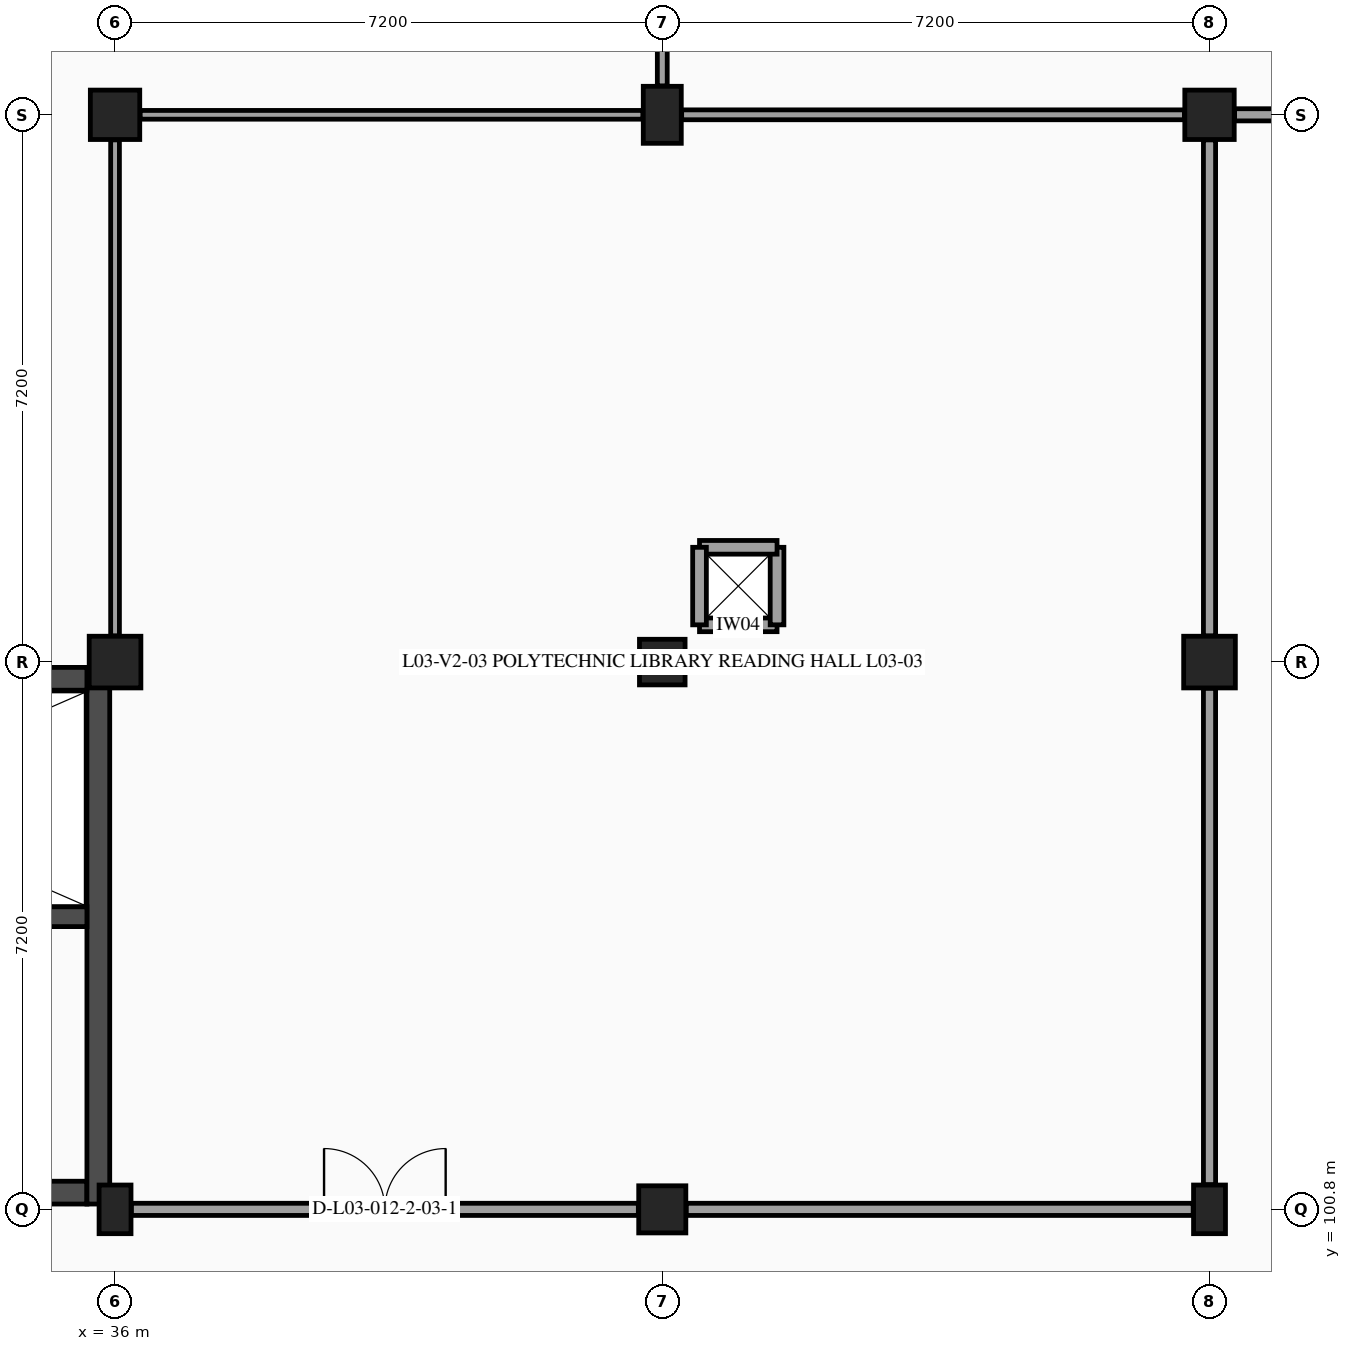
"""IFC4 building model, lengths in metres.
Left out: names, types, materials, properties, quantities, classifications, styles, units other than length and angle.
Written with IfcOpenShell. Run it as: python <this file> out.ifc"""

import sys

from ifc_helpers import new_model, si_unit, direction, frame, frame_2d, origin, origin_2d, place, context, subcontext, project, spatial, rectangle, extrude, element, fill, save


model = new_model("IFC4")
c1 = context("Model", 3, precision=1e-05, world=origin(), true_north=direction((0.0, 1.0)))
c2 = subcontext(c1, "Body", "Model", "MODEL_VIEW")
j1 = project(units=[si_unit("LENGTHUNIT", "METRE"), si_unit("PLANEANGLEUNIT", "RADIAN")], contexts=[c1])
p1 = place(None, origin())
s1 = spatial("IfcSite", under=j1, at=p1, CompositionType="ELEMENT")
p2 = place(p1, origin())
s2 = spatial("IfcBuilding", under=s1, at=p2, CompositionType="ELEMENT")
p3 = place(p2, frame((0.0, 0.0, 14.4)))
s3 = spatial("IfcBuildingStorey", under=s2, at=p3, CompositionType="ELEMENT", Elevation=14.4)
p4 = place(p3, frame((36.0, 100.8, 0.0), z_axis=(0.0, 0.0, 1.0), x_axis=(1.0, 0.0, 0.0)))
e1 = element("IfcColumn", 1, at=p4, inside=s3, PredefinedType="PILASTER", context=c2, shape_type="SweptSolid", body=[
    extrude(rectangle(XDim=0.42, YDim=0.64, at=origin_2d()), origin(), (0.0, 0.0, 1.0), 4.2),
])
p5 = place(p3, frame((36.0, 108.0, 0.0), z_axis=(0.0, 0.0, 1.0), x_axis=(1.0, 0.0, 0.0)))
e2 = element("IfcColumn", 2, at=p5, inside=s3, PredefinedType="COLUMN", context=c2, shape_type="SweptSolid", body=[
    extrude(rectangle(XDim=0.68, YDim=0.68, at=origin_2d()), origin(), (0.0, 0.0, 1.0), 4.2),
])
p6 = place(p3, frame((36.0, 115.2, 0.0), z_axis=(0.0, 0.0, 1.0), x_axis=(1.0, 0.0, 0.0)))
e3 = element("IfcColumn", 3, at=p6, inside=s3, PredefinedType="COLUMN", context=c2, shape_type="SweptSolid", body=[
    extrude(rectangle(XDim=0.65, YDim=0.65, at=origin_2d()), origin(), (0.0, 0.0, 1.0), 4.2),
])
p7 = place(p3, frame((43.2, 100.8, 0.0), z_axis=(0.0, 0.0, 1.0), x_axis=(1.0, 0.0, 0.0)))
e4 = element("IfcColumn", 4, at=p7, inside=s3, PredefinedType="COLUMN", context=c2, shape_type="SweptSolid", body=[
    extrude(rectangle(XDim=0.62, YDim=0.62, at=origin_2d()), origin(), (0.0, 0.0, 1.0), 4.2),
])
p8 = place(p3, frame((43.2, 108.0, 0.0), z_axis=(0.0, 0.0, 1.0), x_axis=(1.0, 0.0, 0.0)))
e5 = element("IfcColumn", 5, at=p8, inside=s3, PredefinedType="COLUMN", context=c2, shape_type="SweptSolid", body=[
    extrude(rectangle(XDim=0.6, YDim=0.6, at=origin_2d()), origin(), (0.0, 0.0, 1.0), 4.2),
])
p9 = place(p3, frame((43.2, 115.2, 0.0), z_axis=(0.0, 0.0, 1.0), x_axis=(1.0, 0.0, 0.0)))
e6 = element("IfcColumn", 6, at=p9, inside=s3, PredefinedType="COLUMN", context=c2, shape_type="SweptSolid", body=[
    extrude(rectangle(XDim=0.5, YDim=0.75, at=origin_2d()), origin(), (0.0, 0.0, 1.0), 4.2),
])
p10 = place(p3, frame((50.4, 100.8, 0.0), z_axis=(0.0, 0.0, 1.0), x_axis=(1.0, 0.0, 0.0)))
e7 = element("IfcColumn", 7, at=p10, inside=s3, PredefinedType="PILASTER", context=c2, shape_type="SweptSolid", body=[
    extrude(rectangle(XDim=0.42, YDim=0.64, at=origin_2d()), origin(), (0.0, 0.0, 1.0), 4.2),
])
p11 = place(p3, frame((50.4, 108.0, 0.0), z_axis=(0.0, 0.0, 1.0), x_axis=(1.0, 0.0, 0.0)))
e8 = element("IfcColumn", 8, at=p11, inside=s3, PredefinedType="COLUMN", context=c2, shape_type="SweptSolid", body=[
    extrude(rectangle(XDim=0.68, YDim=0.68, at=origin_2d()), origin(), (0.0, 0.0, 1.0), 4.2),
])
p12 = place(p3, frame((50.4, 115.2, 0.0), z_axis=(0.0, 0.0, 1.0), x_axis=(1.0, 0.0, 0.0)))
e9 = element("IfcColumn", 9, at=p12, inside=s3, PredefinedType="COLUMN", context=c2, shape_type="SweptSolid", body=[
    extrude(rectangle(XDim=0.65, YDim=0.65, at=origin_2d()), origin(), (0.0, 0.0, 1.0), 4.2),
])
p13 = place(p3, frame((28.95, 101.02, 0.0), z_axis=(0.0, 0.0, 1.0), x_axis=(1.0, 0.0, 0.0)))
e10 = element("IfcWall", 10, at=p13, inside=s3, PredefinedType="SHEAR", context=c2, shape_type="SweptSolid", body=[
    extrude(rectangle(XDim=6.68, YDim=0.3, at=frame_2d((3.34, 0.0))), origin(), (0.0, 0.0, 1.0), 3.94),
])
p14 = place(p13, frame((2.22, 0.0, 0.0)))
e11 = element("IfcOpeningElement", 11, at=p14, cuts=e10, PredefinedType="OPENING", context=c2, shape_type="SweptSolid", body=[
    extrude(rectangle(XDim=1.8, YDim=2.2, at=frame_2d((0.9, 1.1))), frame((0.0, 0.16, 0.0), z_axis=(0.0, -1.0, 0.0), x_axis=(1.0, 0.0, 0.0)), (0.0, 0.0, 1.0), 0.32),
])
p15 = place(p3, frame((35.78, 100.87, 0.0), z_axis=(0.0, 0.0, 1.0), x_axis=(0.0, 1.0, 0.0)))
e12 = element("IfcWall", 12, at=p15, inside=s3, PredefinedType="SHEAR", context=c2, shape_type="SweptSolid", body=[
    extrude(rectangle(XDim=7.06, YDim=0.3, at=frame_2d((3.53, 0.0))), origin(), (0.0, 0.0, 1.0), 3.94),
])
p16 = place(p3, frame((28.95, 107.78, 0.0), z_axis=(0.0, 0.0, 1.0), x_axis=(1.0, 0.0, 0.0)))
e13 = element("IfcWall", 13, at=p16, inside=s3, PredefinedType="SHEAR", context=c2, shape_type="SweptSolid", body=[
    extrude(rectangle(XDim=6.68, YDim=0.3, at=frame_2d((3.34, 0.0))), origin(), (0.0, 0.0, 1.0), 3.94),
])
p17 = place(p3, frame((28.95, 104.65, 0.0), z_axis=(0.0, 0.0, 1.0), x_axis=(1.0, 0.0, 0.0)))
e14 = element("IfcWall", 14, at=p17, inside=s3, PredefinedType="SHEAR", context=c2, shape_type="SweptSolid", body=[
    extrude(rectangle(XDim=6.68, YDim=0.26, at=frame_2d((3.34, 0.0))), origin(), (0.0, 0.0, 1.0), 3.94),
])
p18 = place(p17, frame((0.95, 0.0, 0.0)))
e15 = element("IfcOpeningElement", 15, at=p18, cuts=e14, PredefinedType="OPENING", context=c2, shape_type="SweptSolid", body=[
    extrude(rectangle(XDim=1.1, YDim=2.2, at=frame_2d((0.55, 1.1))), frame((0.0, 0.14, 0.0), z_axis=(0.0, -1.0, 0.0), x_axis=(1.0, 0.0, 0.0)), (0.0, 0.0, 1.0), 0.28),
])
p19 = place(p17, frame((4.1, 0.0, 0.0)))
e16 = element("IfcOpeningElement", 16, at=p19, cuts=e14, PredefinedType="OPENING", context=c2, shape_type="SweptSolid", body=[
    extrude(rectangle(XDim=1.0, YDim=2.15, at=frame_2d((0.5, 1.075))), frame((0.0, 0.14, 0.0), z_axis=(0.0, -1.0, 0.0), x_axis=(1.0, 0.0, 0.0)), (0.0, 0.0, 1.0), 0.28),
])
for number, where, z_axis, x_axis in (
    (17, (43.69, 108.49, 0.0), (0.0, 0.0, 1.0), (1.0, 0.0, 0.0)),
    (18, (44.71, 108.49, 0.0), (0.0, 0.0, 1.0), (0.0, 1.0, 0.0)),
    (19, (44.71, 109.51, 0.0), (0.0, 0.0, 1.0), (-1.0, 0.0, 0.0)),
    (20, (43.69, 109.51, 0.0), (0.0, 0.0, 1.0), (0.0, -1.0, 0.0)),
):
    element("IfcWall", number, at=place(p3, frame(where, z_axis=z_axis, x_axis=x_axis)), inside=s3, PredefinedType="PARTITIONING", context=c2, shape_type="SweptSolid", body=[
        extrude(rectangle(XDim=1.02, YDim=0.18, at=frame_2d((0.51, 0.0))), origin(), (0.0, 0.0, 1.0), 3.94),
    ])
p20 = place(p3, frame((36.0, 108.345, 0.0), z_axis=(0.0, 0.0, 1.0), x_axis=(0.0, 1.0, 0.0)))
e21 = element("IfcWall", 21, at=p20, inside=s3, PredefinedType="PARTITIONING", context=c2, shape_type="SweptSolid", body=[
    extrude(rectangle(XDim=6.525, YDim=0.115, at=frame_2d((3.263, 0.0))), origin(), (0.0, 0.0, 1.0), 3.245),
])
p21 = place(p3, frame((36.215, 100.8, 0.0), z_axis=(0.0, 0.0, 1.0), x_axis=(1.0, 0.0, 0.0)))
e22 = element("IfcWall", 22, at=p21, inside=s3, PredefinedType="PARTITIONING", context=c2, shape_type="SweptSolid", body=[
    extrude(rectangle(XDim=6.67, YDim=0.16, at=frame_2d((3.335, 0.0))), origin(), (0.0, 0.0, 1.0), 3.3),
])
p22 = place(p21, frame((2.535, 0.0, 0.0)))
e23 = element("IfcOpeningElement", 23, at=p22, cuts=e22, PredefinedType="OPENING", context=c2, shape_type="SweptSolid", body=[
    extrude(rectangle(XDim=1.6, YDim=2.2, at=frame_2d((0.8, 1.1))), frame((0.0, 0.09, 0.0), z_axis=(0.0, -1.0, 0.0), x_axis=(1.0, 0.0, 0.0)), (0.0, 0.0, 1.0), 0.18),
])
p23 = place(p3, frame((36.33, 115.2, 0.0), z_axis=(0.0, 0.0, 1.0), x_axis=(1.0, 0.0, 0.0)))
e24 = element("IfcWall", 24, at=p23, inside=s3, PredefinedType="PARTITIONING", context=c2, shape_type="SweptSolid", body=[
    extrude(rectangle(XDim=6.615, YDim=0.115, at=frame_2d((3.308, 0.0))), origin(), (0.0, 0.0, 1.0), 3.3),
])
p24 = place(p3, frame((43.2, 115.58, 0.0), z_axis=(0.0, 0.0, 1.0), x_axis=(0.0, 1.0, 0.0)))
e25 = element("IfcWall", 25, at=p24, inside=s3, PredefinedType="PARTITIONING", context=c2, shape_type="SweptSolid", body=[
    extrude(rectangle(XDim=6.495, YDim=0.13, at=frame_2d((3.248, 0.0))), origin(), (0.0, 0.0, 1.0), 3.245),
])
p25 = place(p24, frame((2.508, 0.0, 0.0)))
e26 = element("IfcOpeningElement", 26, at=p25, cuts=e25, PredefinedType="OPENING", context=c2, shape_type="SweptSolid", body=[
    extrude(rectangle(XDim=1.48, YDim=2.28, at=frame_2d((0.74, 1.14))), frame((0.0, 0.075, 0.0), z_axis=(0.0, -1.0, 0.0), x_axis=(1.0, 0.0, 0.0)), (0.0, 0.0, 1.0), 0.15),
])
p26 = place(p3, frame((43.515, 100.8, 0.0), z_axis=(0.0, 0.0, 1.0), x_axis=(1.0, 0.0, 0.0)))
e27 = element("IfcWall", 27, at=p26, inside=s3, PredefinedType="PARTITIONING", context=c2, shape_type="SweptSolid", body=[
    extrude(rectangle(XDim=6.67, YDim=0.16, at=frame_2d((3.335, 0.0))), origin(), (0.0, 0.0, 1.0), 3.14),
])
p27 = place(p3, frame((50.4, 101.125, 0.0), z_axis=(0.0, 0.0, 1.0), x_axis=(0.0, 1.0, 0.0)))
e28 = element("IfcWall", 28, at=p27, inside=s3, PredefinedType="PARTITIONING", context=c2, shape_type="SweptSolid", body=[
    extrude(rectangle(XDim=6.53, YDim=0.16, at=frame_2d((3.265, 0.0))), origin(), (0.0, 0.0, 1.0), 3.25),
])
p28 = place(p3, frame((50.4, 108.345, 0.0), z_axis=(0.0, 0.0, 1.0), x_axis=(0.0, 1.0, 0.0)))
e29 = element("IfcWall", 29, at=p28, inside=s3, PredefinedType="PARTITIONING", context=c2, shape_type="SweptSolid", body=[
    extrude(rectangle(XDim=6.525, YDim=0.16, at=frame_2d((3.263, 0.0))), origin(), (0.0, 0.0, 1.0), 3.245),
])
p29 = place(p3, frame((43.455, 115.2, 0.0), z_axis=(0.0, 0.0, 1.0), x_axis=(1.0, 0.0, 0.0)))
e30 = element("IfcWall", 30, at=p29, inside=s3, PredefinedType="PARTITIONING", context=c2, shape_type="SweptSolid", body=[
    extrude(rectangle(XDim=6.615, YDim=0.13, at=frame_2d((3.308, 0.0))), origin(), (0.0, 0.0, 1.0), 3.14),
])
p30 = place(p3, frame((50.73, 115.2, 0.0), z_axis=(0.0, 0.0, 1.0), x_axis=(1.0, 0.0, 0.0)))
e31 = element("IfcWall", 31, at=p30, inside=s3, PredefinedType="PARTITIONING", context=c2, shape_type="SweptSolid", body=[
    extrude(rectangle(XDim=6.615, YDim=0.16, at=frame_2d((3.308, 0.0))), origin(), (0.0, 0.0, 1.0), 3.16),
])
p31 = place(p22, origin())
e32 = element("IfcDoor", 32, at=p31, inside=s3, OperationType="DOUBLE_DOOR_SINGLE_SWING", PredefinedType="DOOR", context=c2, shape_type="SweptSolid", body=[
    extrude(rectangle(XDim=1.6, YDim=2.2, at=frame_2d((0.8, 1.1))), frame((0.0, 0.025, 0.0), z_axis=(0.0, -1.0, 0.0), x_axis=(1.0, 0.0, 0.0)), (0.0, 0.0, 1.0), 0.05),
])
fill(e23, e32)
save(model, sys.argv[1])
